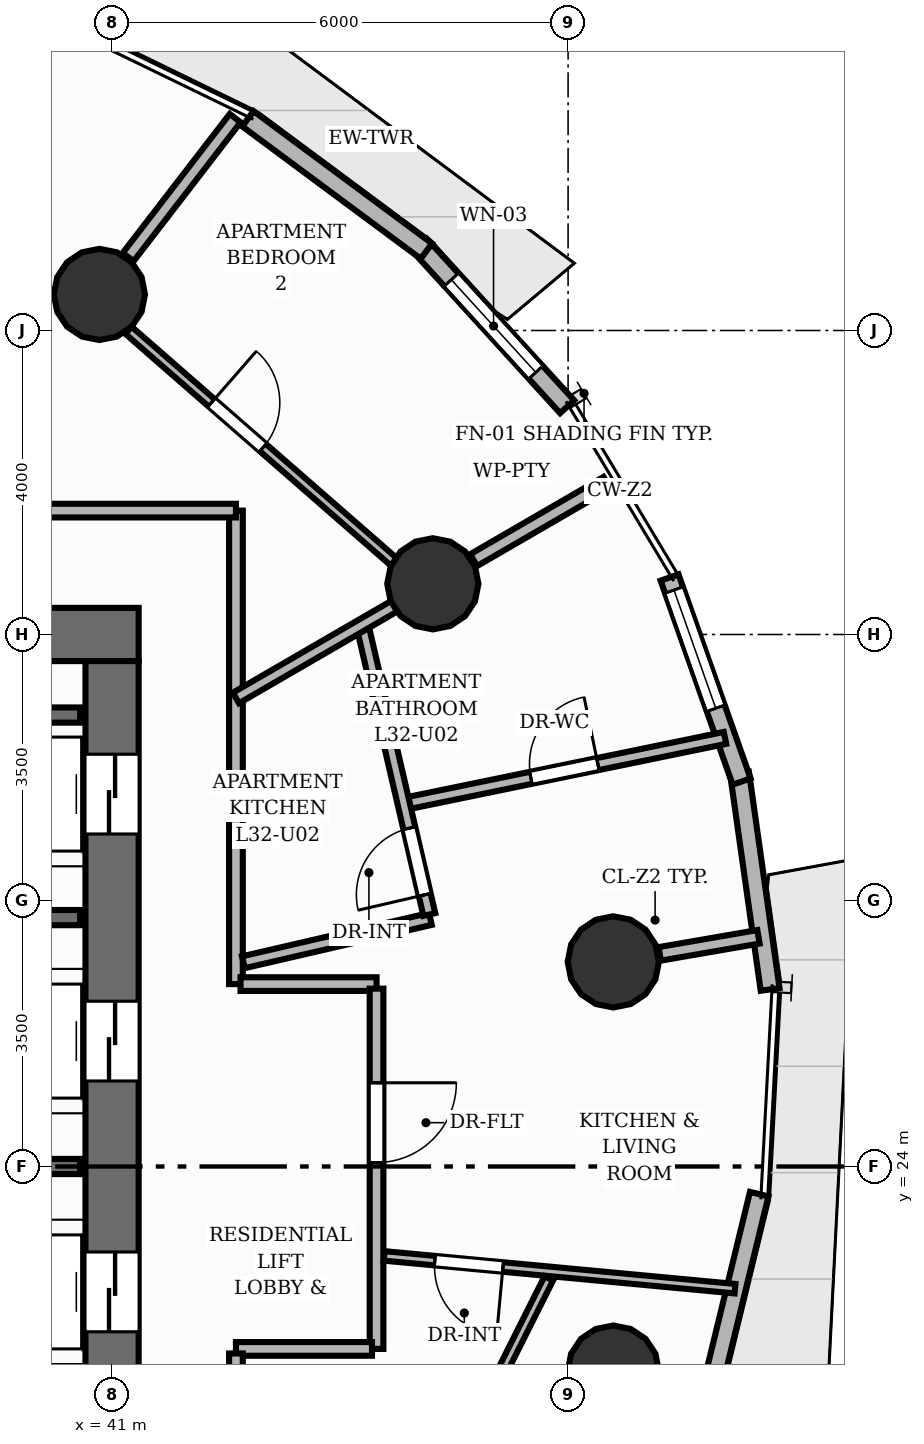
"""IFC4 building model, lengths in metres.
Left out: names, types, materials, properties, quantities, classifications, styles, units other than length and angle.
Written with IfcOpenShell. Run it as: python <this file> out.ifc"""

import sys

from ifc_helpers import new_model, si_unit, direction, frame, frame_2d, origin, origin_2d, place, context, subcontext, project, spatial, rectangle, circle, extrude, element, fill, save


model = new_model("IFC4")
c1 = context("Model", 3, precision=1e-05, world=origin(), true_north=direction((0.0, 1.0)))
c2 = subcontext(c1, "Body", "Model", "MODEL_VIEW")
j1 = project(units=[si_unit("LENGTHUNIT", "METRE"), si_unit("PLANEANGLEUNIT", "RADIAN")], contexts=[c1])
p1 = place(None, origin())
s1 = spatial("IfcSite", under=j1, at=p1, CompositionType="ELEMENT")
p2 = place(p1, origin())
s2 = spatial("IfcBuilding", under=s1, at=p2, CompositionType="ELEMENT")
p3 = place(p2, frame((0.0, 0.0, 109.28)))
s3 = spatial("IfcBuildingStorey", under=s2, at=p3, CompositionType="ELEMENT", Elevation=109.28)
p4 = place(p3, frame((22.65, 31.0, 0.0), z_axis=(0.0, 0.0, 1.0), x_axis=(1.0, 0.0, 0.0)))
e1 = element("IfcWall", 1, at=p4, inside=s3, PredefinedType="SHEAR", context=c2, shape_type="SweptSolid", body=[
    extrude(rectangle(XDim=18.7, YDim=0.7, at=frame_2d((9.35, 0.0))), origin(), (0.0, 0.0, 1.0), 3.2),
])
p5 = place(p4, frame((11.75, 0.0, 0.0)))
e2 = element("IfcOpeningElement", 2, at=p5, cuts=e1, PredefinedType="OPENING", context=c2, shape_type="SweptSolid", body=[
    extrude(rectangle(XDim=1.1, YDim=2.15, at=frame_2d((0.55, 1.075))), frame((0.0, 0.36, 0.0), z_axis=(0.0, -1.0, 0.0), x_axis=(1.0, 0.0, 0.0)), (0.0, 0.0, 1.0), 0.72),
])
p6 = place(p3, frame((41.0, 17.35, 0.0), z_axis=(0.0, 0.0, 1.0), x_axis=(0.0, 1.0, 0.0)))
e3 = element("IfcWall", 3, at=p6, inside=s3, PredefinedType="SHEAR", context=c2, shape_type="SweptSolid", body=[
    extrude(rectangle(XDim=13.3, YDim=0.7, at=frame_2d((6.65, 0.0))), origin(), (0.0, 0.0, 1.0), 3.2),
])
p7 = place(p6, frame((1.225, 0.0, 0.0)))
e4 = element("IfcOpeningElement", 4, at=p7, cuts=e3, PredefinedType="OPENING", context=c2, shape_type="SweptSolid", body=[
    extrude(rectangle(XDim=1.05, YDim=2.0, at=frame_2d((0.525, 1.0))), frame((0.0, 0.36, 0.0), z_axis=(0.0, -1.0, 0.0), x_axis=(1.0, 0.0, 0.0)), (0.0, 0.0, 1.0), 0.72),
])
p8 = place(p6, frame((4.475, 0.0, 0.0)))
e5 = element("IfcOpeningElement", 5, at=p8, cuts=e3, PredefinedType="OPENING", context=c2, shape_type="SweptSolid", body=[
    extrude(rectangle(XDim=1.05, YDim=2.0, at=frame_2d((0.525, 1.0))), frame((0.0, 0.36, 0.0), z_axis=(0.0, -1.0, 0.0), x_axis=(1.0, 0.0, 0.0)), (0.0, 0.0, 1.0), 0.72),
])
p9 = place(p6, frame((7.775, 0.0, 0.0)))
e6 = element("IfcOpeningElement", 6, at=p9, cuts=e3, PredefinedType="OPENING", context=c2, shape_type="SweptSolid", body=[
    extrude(rectangle(XDim=1.05, YDim=2.0, at=frame_2d((0.525, 1.0))), frame((0.0, 0.36, 0.0), z_axis=(0.0, -1.0, 0.0), x_axis=(1.0, 0.0, 0.0)), (0.0, 0.0, 1.0), 0.72),
])
p10 = place(p6, frame((11.025, 0.0, 0.0)))
e7 = element("IfcOpeningElement", 7, at=p10, cuts=e3, PredefinedType="OPENING", context=c2, shape_type="SweptSolid", body=[
    extrude(rectangle(XDim=1.05, YDim=2.0, at=frame_2d((0.525, 1.0))), frame((0.0, 0.36, 0.0), z_axis=(0.0, -1.0, 0.0), x_axis=(1.0, 0.0, 0.0)), (0.0, 0.0, 1.0), 0.72),
])
for number, where, z_axis, x_axis in (
    (8, (47.594, 26.692, 0.0), (0.0, 0.0, 1.0), (1.0, 0.0, 0.0)),
    (9, (45.22, 31.667, 0.0), (0.0, 0.0, 1.0), (1.0, 0.0, 0.0)),
    (10, (40.833, 35.474, 0.0), (0.0, 0.0, 1.0), (1.0, 0.0, 0.0)),
    (11, (47.594, 21.308, 0.0), (0.0, 0.0, 1.0), (1.0, 0.0, 0.0)),
):
    element("IfcColumn", number, at=place(p3, frame(where, z_axis=z_axis, x_axis=x_axis)), inside=s3, PredefinedType="COLUMN", context=c2, shape_type="SweptSolid", body=[
        extrude(circle(Radius=0.6, at=origin_2d()), origin(), (0.0, 0.0, 1.0), 3.2),
    ])
p11 = place(p3, frame((45.051, 36.121, 0.0), z_axis=(0.0, 0.0, 1.0), x_axis=(0.673691100196, -0.739013059098, 0.0)))
e12 = element("IfcWall", 12, at=p11, inside=s3, PredefinedType="SOLIDWALL", context=c2, shape_type="SweptSolid", body=[
    extrude(rectangle(XDim=2.874, YDim=0.25, at=frame_2d((1.437, 0.0))), origin(), (0.0, 0.0, 1.0), 2.8),
])
p12 = place(p11, frame((0.612, 0.0, 0.85)))
e13 = element("IfcOpeningElement", 13, at=p12, cuts=e12, PredefinedType="OPENING", context=c2, shape_type="SweptSolid", body=[
    extrude(rectangle(XDim=1.65, YDim=1.55, at=frame_2d((0.825, 0.775))), frame((0.0, 0.135, 0.0), z_axis=(0.0, -1.0, 0.0), x_axis=(1.0, 0.0, 0.0)), (0.0, 0.0, 1.0), 0.27),
])
p13 = place(p3, frame((42.787, 37.785, 0.0), z_axis=(0.0, 0.0, 1.0), x_axis=(0.803255279066, -0.595634918933, 0.0)))
e14 = element("IfcWall", 14, at=p13, inside=s3, PredefinedType="SOLIDWALL", context=c2, shape_type="SweptSolid", body=[
    extrude(rectangle(XDim=2.923, YDim=0.25, at=frame_2d((1.462, 0.0))), origin(), (0.0, 0.0, 1.0), 2.8),
])
p14 = place(p3, frame((49.514, 23.636, 0.0), z_axis=(0.0, 0.0, 1.0), x_axis=(-0.236668427837, -0.971590477138, 0.0)))
e15 = element("IfcWall", 15, at=p14, inside=s3, PredefinedType="SOLIDWALL", context=c2, shape_type="SweptSolid", body=[
    extrude(rectangle(XDim=2.989, YDim=0.25, at=frame_2d((1.494, 0.0))), origin(), (0.0, 0.0, 1.0), 2.8),
])
p15 = place(p3, frame((49.256, 29.176, 0.0), z_axis=(0.0, 0.0, 1.0), x_axis=(0.139982311006, -0.990154004489, 0.0)))
e16 = element("IfcWall", 16, at=p15, inside=s3, PredefinedType="SOLIDWALL", context=c2, shape_type="SweptSolid", body=[
    extrude(rectangle(XDim=2.874, YDim=0.25, at=frame_2d((1.437, 0.0))), origin(), (0.0, 0.0, 1.0), 2.8),
])
p16 = place(p3, frame((48.335, 31.75, 0.0), z_axis=(0.0, 0.0, 1.0), x_axis=(0.332923265962, -0.942953921982, 0.0)))
e17 = element("IfcWall", 17, at=p16, inside=s3, PredefinedType="SOLIDWALL", context=c2, shape_type="SweptSolid", body=[
    extrude(rectangle(XDim=2.847, YDim=0.25, at=frame_2d((1.424, 0.0))), origin(), (0.0, 0.0, 1.0), 2.8),
])
p17 = place(p16, frame((0.175, 0.0, 0.85)))
e18 = element("IfcOpeningElement", 18, at=p17, cuts=e17, PredefinedType="OPENING", context=c2, shape_type="SweptSolid", body=[
    extrude(rectangle(XDim=1.65, YDim=1.55, at=frame_2d((0.825, 0.775))), frame((0.0, 0.135, 0.0), z_axis=(0.0, -1.0, 0.0), x_axis=(1.0, 0.0, 0.0)), (0.0, 0.0, 1.0), 0.27),
])
for number, where, z_axis, x_axis in (
    (19, (38.87, 29.94, 0.0), (0.0, 0.0, 1.0), (1.0, 0.0, 0.0)),
    (20, (38.87, 24.0, 0.0), (0.0, 0.0, 1.0), (1.0, 0.0, 0.0)),
    (21, (38.87, 27.275, 0.0), (0.0, 0.0, 1.0), (1.0, 0.0, 0.0)),
):
    element("IfcWall", number, at=place(p3, frame(where, z_axis=z_axis, x_axis=x_axis)), inside=s3, PredefinedType="SHEAR", context=c2, shape_type="SweptSolid", body=[
        extrude(rectangle(XDim=1.71, YDim=0.2, at=frame_2d((0.855, 0.0))), origin(), (0.0, 0.0, 1.0), 3.2),
    ])
p18 = place(p3, frame((48.206, 26.798, 0.0), z_axis=(0.0, 0.0, 1.0), x_axis=(0.98541625201, 0.170161130326, 0.0)))
e22 = element("IfcWall", 22, at=p18, inside=s3, PredefinedType="PARTITIONING", context=c2, shape_type="SweptSolid", body=[
    extrude(rectangle(XDim=1.319, YDim=0.18, at=frame_2d((0.659, 0.0))), origin(), (0.0, 0.0, 1.0), 2.1),
])
p19 = place(p3, frame((45.757, 31.978, 0.0), z_axis=(0.0, 0.0, 1.0), x_axis=(0.865046864493, 0.501691062539, 0.0)))
e23 = element("IfcWall", 23, at=p19, inside=s3, PredefinedType="PARTITIONING", context=c2, shape_type="SweptSolid", body=[
    extrude(rectangle(XDim=2.028, YDim=0.18, at=frame_2d((1.014, 0.0))), origin(), (0.0, 0.0, 1.0), 2.1),
])
p20 = place(p3, frame((41.212, 35.966, 0.0), z_axis=(0.0, 0.0, 1.0), x_axis=(0.610007255548, 0.792395827967, 0.0)))
e24 = element("IfcWall", 24, at=p20, inside=s3, PredefinedType="PARTITIONING", context=c2, shape_type="SweptSolid", body=[
    extrude(rectangle(XDim=2.308, YDim=0.18, at=frame_2d((1.154, 0.0))), origin(), (0.0, 0.0, 1.0), 2.1),
])
p21 = place(p3, frame((42.63, 32.63, 0.0), z_axis=(0.0, 0.0, 1.0), x_axis=(0.0, -1.0, 0.0)))
e25 = element("IfcWall", 25, at=p21, inside=s3, PredefinedType="PARTITIONING", context=c2, shape_type="SweptSolid", body=[
    extrude(rectangle(XDim=6.23, YDim=0.18, at=frame_2d((3.115, 0.0))), origin(), (0.0, 0.0, 1.0), 2.795),
])
p22 = place(p3, frame((42.69, 26.4, 0.0), z_axis=(0.0, 0.0, 1.0), x_axis=(1.0, 0.0, 0.0)))
e26 = element("IfcWall", 26, at=p22, inside=s3, PredefinedType="PARTITIONING", context=c2, shape_type="SweptSolid", body=[
    extrude(rectangle(XDim=1.79, YDim=0.18, at=frame_2d((0.895, 0.0))), origin(), (0.0, 0.0, 1.0), 2.1),
])
p23 = place(p3, frame((44.48, 26.34, 0.0), z_axis=(0.0, 0.0, 1.0), x_axis=(0.0, -1.0, 0.0)))
e27 = element("IfcWall", 27, at=p23, inside=s3, PredefinedType="PARTITIONING", context=c2, shape_type="SweptSolid", body=[
    extrude(rectangle(XDim=4.74, YDim=0.18, at=frame_2d((2.37, 0.0))), origin(), (0.0, 0.0, 1.0), 2.795),
])
p24 = place(p23, frame((1.239, 0.0, 0.0)))
e28 = element("IfcOpeningElement", 28, at=p24, cuts=e27, PredefinedType="OPENING", context=c2, shape_type="SweptSolid", body=[
    extrude(rectangle(XDim=1.05, YDim=2.15, at=frame_2d((0.525, 1.075))), frame((0.0, 0.1, 0.0), z_axis=(0.0, -1.0, 0.0), x_axis=(1.0, 0.0, 0.0)), (0.0, 0.0, 1.0), 0.2),
])
p25 = place(p3, frame((44.42, 21.6, 0.0), z_axis=(0.0, 0.0, 1.0), x_axis=(-1.0, 0.0, 0.0)))
e29 = element("IfcWall", 29, at=p25, inside=s3, PredefinedType="PARTITIONING", context=c2, shape_type="SweptSolid", body=[
    extrude(rectangle(XDim=1.79, YDim=0.18, at=frame_2d((0.895, 0.0))), origin(), (0.0, 0.0, 1.0), 2.1),
])
p26 = place(p3, frame((42.63, 21.54, 0.0), z_axis=(0.0, 0.0, 1.0), x_axis=(0.0, -1.0, 0.0)))
e30 = element("IfcWall", 30, at=p26, inside=s3, PredefinedType="PARTITIONING", context=c2, shape_type="SweptSolid", body=[
    extrude(rectangle(XDim=6.17, YDim=0.18, at=frame_2d((3.085, 0.0))), origin(), (0.0, 0.0, 1.0), 2.795),
])
p27 = place(p3, frame((22.734, 32.63, 0.0), z_axis=(0.0, 0.0, 1.0), x_axis=(1.0, 0.0, 0.0)))
e31 = element("IfcWall", 31, at=p27, inside=s3, PredefinedType="PARTITIONING", context=c2, shape_type="SweptSolid", body=[
    extrude(rectangle(XDim=19.896, YDim=0.18, at=frame_2d((9.948, 0.0))), origin(), (0.0, 0.0, 1.0), 2.795),
])
p28 = place(p27, frame((11.004, 0.0, 0.0)))
e32 = element("IfcOpeningElement", 32, at=p28, cuts=e31, PredefinedType="OPENING", context=c2, shape_type="SweptSolid", body=[
    extrude(rectangle(XDim=1.05, YDim=2.0, at=frame_2d((0.525, 1.0))), frame((0.0, 0.1, 0.0), z_axis=(0.0, -1.0, 0.0), x_axis=(1.0, 0.0, 0.0)), (0.0, 0.0, 1.0), 0.2),
])
p29 = place(p3, frame((44.838, 28.77, 0.0), z_axis=(0.0, 0.0, 1.0), x_axis=(0.97949547816, 0.201466146695, 0.0)))
e33 = element("IfcWall", 33, at=p29, inside=s3, PredefinedType="PLUMBINGWALL", context=c2, shape_type="SweptSolid", body=[
    extrude(rectangle(XDim=4.315, YDim=0.16, at=frame_2d((2.158, 0.0))), origin(), (0.0, 0.0, 1.0), 2.795),
])
p30 = place(p29, frame((1.708, 0.0, 0.0)))
e34 = element("IfcOpeningElement", 34, at=p30, cuts=e33, PredefinedType="OPENING", context=c2, shape_type="SweptSolid", body=[
    extrude(rectangle(XDim=0.9, YDim=2.1, at=frame_2d((0.45, 1.05))), frame((0.0, 0.09, 0.0), z_axis=(0.0, -1.0, 0.0), x_axis=(1.0, 0.0, 0.0)), (0.0, 0.0, 1.0), 0.18),
])
p31 = place(p3, frame((49.196, 22.392, 0.0), z_axis=(0.0, 0.0, 1.0), x_axis=(-0.99565683003, 0.09309928472, 0.0)))
e35 = element("IfcWall", 35, at=p31, inside=s3, PredefinedType="PARTITIONING", context=c2, shape_type="SweptSolid", body=[
    extrude(rectangle(XDim=4.636, YDim=0.125, at=frame_2d((2.318, 0.0))), origin(), (0.0, 0.0, 1.0), 2.795),
])
p32 = place(p31, frame((3.066, 0.0, 0.0)))
e36 = element("IfcOpeningElement", 36, at=p32, cuts=e35, PredefinedType="OPENING", context=c2, shape_type="SweptSolid", body=[
    extrude(rectangle(XDim=0.9, YDim=2.1, at=frame_2d((0.45, 1.05))), frame((0.0, 0.073, 0.0), z_axis=(0.0, -1.0, 0.0), x_axis=(1.0, 0.0, 0.0)), (0.0, 0.0, 1.0), 0.145),
])
p33 = place(p3, frame((42.727, 26.688, 0.0), z_axis=(0.0, 0.0, 1.0), x_axis=(0.974262333638, 0.225417180479, 0.0)))
e37 = element("IfcWall", 37, at=p33, inside=s3, PredefinedType="PLUMBINGWALL", context=c2, shape_type="SweptSolid", body=[
    extrude(rectangle(XDim=2.526, YDim=0.16, at=frame_2d((1.263, 0.0))), origin(), (0.0, 0.0, 1.0), 2.795),
])
p34 = place(p3, frame((45.174, 27.315, 0.0), z_axis=(0.0, 0.0, 1.0), x_axis=(-0.225561032487, 0.974229039099, 0.0)))
e38 = element("IfcWall", 38, at=p34, inside=s3, PredefinedType="PLUMBINGWALL", context=c2, shape_type="SweptSolid", body=[
    extrude(rectangle(XDim=3.914, YDim=0.16, at=frame_2d((1.957, 0.0))), origin(), (0.0, 0.0, 1.0), 2.795),
])
p35 = place(p34, frame((0.266, 0.0, 0.0)))
e39 = element("IfcOpeningElement", 39, at=p35, cuts=e38, PredefinedType="OPENING", context=c2, shape_type="SweptSolid", body=[
    extrude(rectangle(XDim=0.9, YDim=2.1, at=frame_2d((0.45, 1.05))), frame((0.0, 0.09, 0.0), z_axis=(0.0, -1.0, 0.0), x_axis=(1.0, 0.0, 0.0)), (0.0, 0.0, 1.0), 0.18),
])
p36 = place(p3, frame((42.63, 30.165, 0.0), z_axis=(0.0, 0.0, 1.0), x_axis=(0.865092804374, 0.501611841786, 0.0)))
e40 = element("IfcWall", 40, at=p36, inside=s3, PredefinedType="PLUMBINGWALL", context=c2, shape_type="SweptSolid", body=[
    extrude(rectangle(XDim=2.407, YDim=0.16, at=frame_2d((1.204, 0.0))), origin(), (0.0, 0.0, 1.0), 2.1),
])
p37 = place(p3, frame((46.746, 22.528, 0.0), z_axis=(0.0, 0.0, 1.0), x_axis=(-0.448357094434, -0.893854527242, 0.0)))
e41 = element("IfcWall", 41, at=p37, inside=s3, PredefinedType="PARTITIONING", context=c2, shape_type="SweptSolid", body=[
    extrude(rectangle(XDim=11.611, YDim=0.125, at=frame_2d((5.805, 0.0))), origin(), (0.0, 0.0, 1.0), 2.243),
])
p38 = place(p37, frame((4.375, 0.0, 0.0)))
e42 = element("IfcOpeningElement", 42, at=p38, cuts=e41, PredefinedType="OPENING", context=c2, shape_type="SweptSolid", body=[
    extrude(rectangle(XDim=0.9, YDim=2.1, at=frame_2d((0.45, 1.05))), frame((0.0, 0.073, 0.0), z_axis=(0.0, -1.0, 0.0), x_axis=(1.0, 0.0, 0.0)), (0.0, 0.0, 1.0), 0.145),
])
p39 = place(p3, frame((41.216, 35.003, 0.0), z_axis=(0.0, 0.0, 1.0), x_axis=(0.753372011099, -0.657594565741, 0.0)))
e43 = element("IfcWall", 43, at=p39, inside=s3, PredefinedType="PARTITIONING", context=c2, shape_type="SweptSolid", body=[
    extrude(rectangle(XDim=4.637, YDim=0.125, at=frame_2d((2.318, 0.0))), origin(), (0.0, 0.0, 1.0), 2.243),
])
p40 = place(p39, frame((1.448, 0.0, 0.0)))
e44 = element("IfcOpeningElement", 44, at=p40, cuts=e43, PredefinedType="OPENING", context=c2, shape_type="SweptSolid", body=[
    extrude(rectangle(XDim=0.9, YDim=2.1, at=frame_2d((0.45, 1.05))), frame((0.0, 0.073, 0.0), z_axis=(0.0, -1.0, 0.0), x_axis=(1.0, 0.0, 0.0)), (0.0, 0.0, 1.0), 0.145),
])
p41 = place(p12, origin())
e45 = element("IfcWindow", 45, at=p41, inside=s3, PartitioningType="SINGLE_PANEL", PredefinedType="WINDOW", context=c2, shape_type="SweptSolid", body=[
    extrude(rectangle(XDim=1.65, YDim=1.55, at=frame_2d((0.825, 0.775))), frame((0.0, 0.03, 0.0), z_axis=(0.0, -1.0, 0.0), x_axis=(1.0, 0.0, 0.0)), (0.0, 0.0, 1.0), 0.06),
])
fill(e13, e45)
p42 = place(p17, origin())
e46 = element("IfcWindow", 46, at=p42, inside=s3, PartitioningType="SINGLE_PANEL", PredefinedType="WINDOW", context=c2, shape_type="SweptSolid", body=[
    extrude(rectangle(XDim=1.65, YDim=1.55, at=frame_2d((0.825, 0.775))), frame((0.0, 0.03, 0.0), z_axis=(0.0, -1.0, 0.0), x_axis=(1.0, 0.0, 0.0)), (0.0, 0.0, 1.0), 0.06),
])
fill(e18, e46)
p43 = place(p8, origin())
e47 = element("IfcDoor", 47, at=p43, inside=s3, OperationType="DOUBLE_DOOR_SLIDING", PredefinedType="DOOR", context=c2, shape_type="SweptSolid", body=[
    extrude(rectangle(XDim=1.05, YDim=2.0, at=frame_2d((0.525, 1.0))), frame((0.0, 0.025, 0.0), z_axis=(0.0, -1.0, 0.0), x_axis=(1.0, 0.0, 0.0)), (0.0, 0.0, 1.0), 0.05),
])
fill(e5, e47)
p44 = place(p9, origin())
e48 = element("IfcDoor", 48, at=p44, inside=s3, OperationType="DOUBLE_DOOR_SLIDING", PredefinedType="DOOR", context=c2, shape_type="SweptSolid", body=[
    extrude(rectangle(XDim=1.05, YDim=2.0, at=frame_2d((0.525, 1.0))), frame((0.0, 0.025, 0.0), z_axis=(0.0, -1.0, 0.0), x_axis=(1.0, 0.0, 0.0)), (0.0, 0.0, 1.0), 0.05),
])
fill(e6, e48)
p45 = place(p10, origin())
e49 = element("IfcDoor", 49, at=p45, inside=s3, OperationType="DOUBLE_DOOR_SLIDING", PredefinedType="DOOR", context=c2, shape_type="SweptSolid", body=[
    extrude(rectangle(XDim=1.05, YDim=2.0, at=frame_2d((0.525, 1.0))), frame((0.0, 0.025, 0.0), z_axis=(0.0, -1.0, 0.0), x_axis=(1.0, 0.0, 0.0)), (0.0, 0.0, 1.0), 0.05),
])
fill(e7, e49)
p46 = place(p24, origin())
e50 = element("IfcDoor", 50, at=p46, inside=s3, OperationType="SINGLE_SWING_LEFT", PredefinedType="DOOR", context=c2, shape_type="SweptSolid", body=[
    extrude(rectangle(XDim=1.05, YDim=2.15, at=frame_2d((0.525, 1.075))), frame((0.0, 0.025, 0.0), z_axis=(0.0, -1.0, 0.0), x_axis=(1.0, 0.0, 0.0)), (0.0, 0.0, 1.0), 0.05),
])
fill(e28, e50)
p47 = place(p30, origin())
e51 = element("IfcDoor", 51, at=p47, inside=s3, OperationType="SINGLE_SWING_RIGHT", PredefinedType="DOOR", context=c2, shape_type="SweptSolid", body=[
    extrude(rectangle(XDim=0.9, YDim=2.1, at=frame_2d((0.45, 1.05))), frame((0.0, 0.025, 0.0), z_axis=(0.0, -1.0, 0.0), x_axis=(1.0, 0.0, 0.0)), (0.0, 0.0, 1.0), 0.05),
])
fill(e34, e51)
p48 = place(p32, origin())
e52 = element("IfcDoor", 52, at=p48, inside=s3, OperationType="SINGLE_SWING_LEFT", PredefinedType="DOOR", context=c2, shape_type="SweptSolid", body=[
    extrude(rectangle(XDim=0.9, YDim=2.1, at=frame_2d((0.45, 1.05))), frame((0.0, 0.025, 0.0), z_axis=(0.0, -1.0, 0.0), x_axis=(1.0, 0.0, 0.0)), (0.0, 0.0, 1.0), 0.05),
])
fill(e36, e52)
p49 = place(p35, origin())
e53 = element("IfcDoor", 53, at=p49, inside=s3, OperationType="SINGLE_SWING_LEFT", PredefinedType="DOOR", context=c2, shape_type="SweptSolid", body=[
    extrude(rectangle(XDim=0.9, YDim=2.1, at=frame_2d((0.45, 1.05))), frame((0.0, 0.025, 0.0), z_axis=(0.0, -1.0, 0.0), x_axis=(1.0, 0.0, 0.0)), (0.0, 0.0, 1.0), 0.05),
])
fill(e39, e53)
p50 = place(p40, origin())
e54 = element("IfcDoor", 54, at=p50, inside=s3, OperationType="SINGLE_SWING_LEFT", PredefinedType="DOOR", context=c2, shape_type="SweptSolid", body=[
    extrude(rectangle(XDim=0.9, YDim=2.1, at=frame_2d((0.45, 1.05))), frame((0.0, 0.025, 0.0), z_axis=(0.0, -1.0, 0.0), x_axis=(1.0, 0.0, 0.0)), (0.0, 0.0, 1.0), 0.05),
])
fill(e44, e54)
save(model, sys.argv[1])
